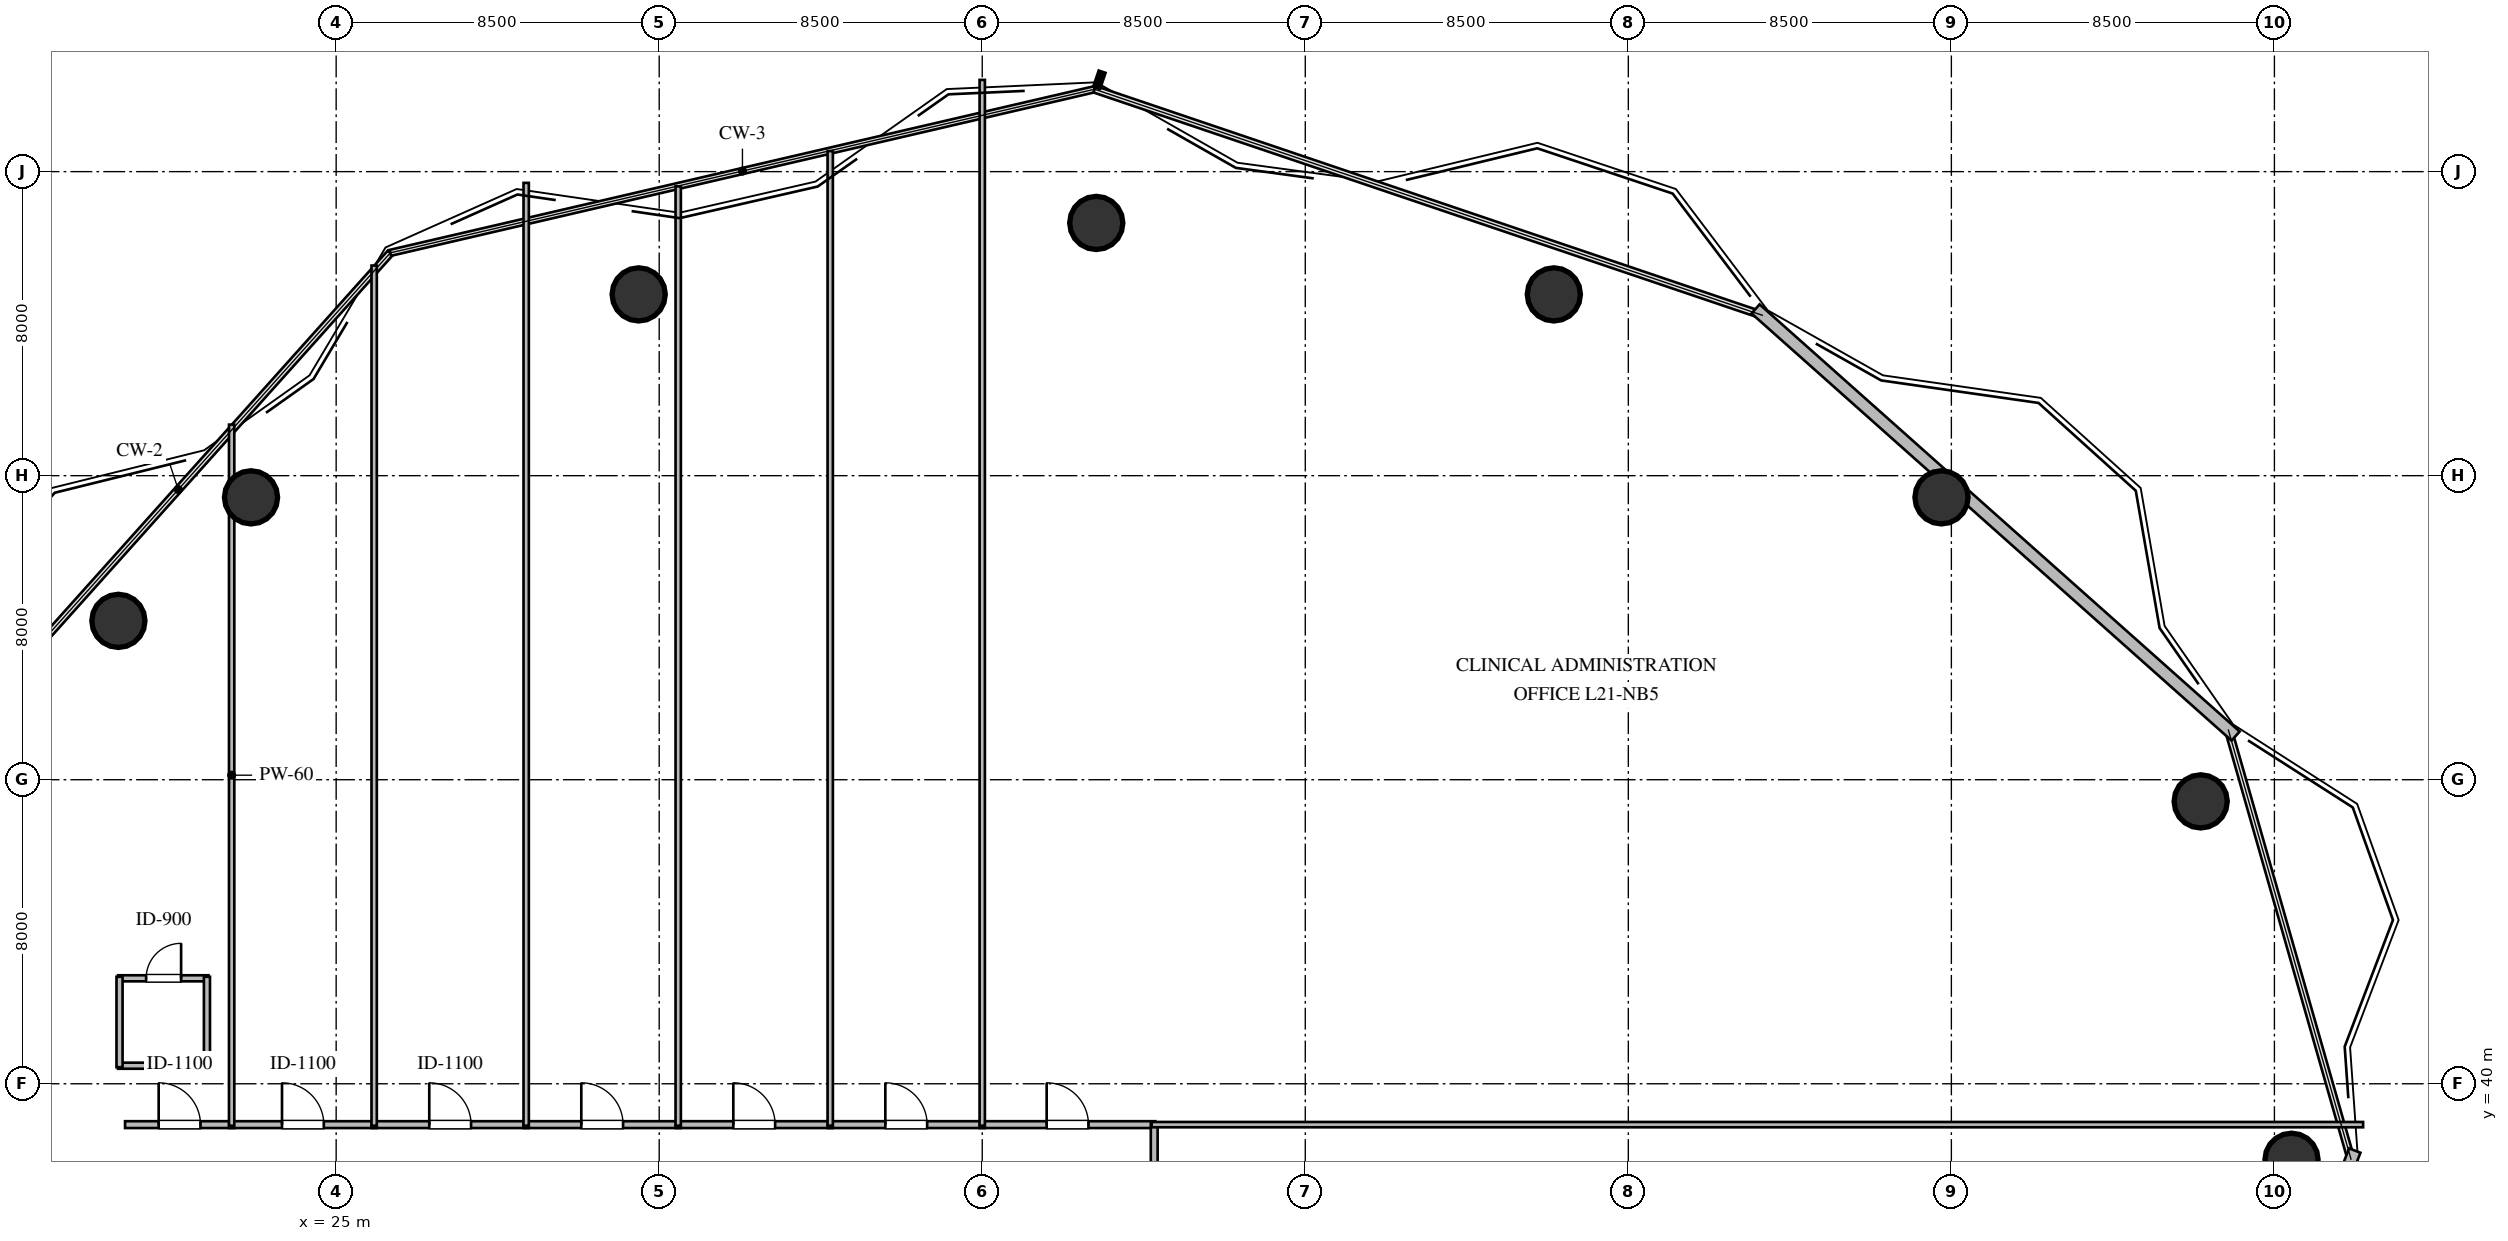
"""IFC4 building model, lengths in metres.
Left out: names, types, materials, properties, quantities, classifications, styles, units other than length and angle.
Written with IfcOpenShell. Run it as: python <this file> out.ifc"""

import sys

from ifc_helpers import new_model, si_unit, direction, frame, frame_2d, origin, origin_2d, place, context, subcontext, project, spatial, rectangle, circle, extrude, element, fill, save


model = new_model("IFC4")
c1 = context("Model", 3, precision=1e-05, world=origin(), true_north=direction((0.0, 1.0)))
c2 = subcontext(c1, "Body", "Model", "MODEL_VIEW")
j1 = project(units=[si_unit("LENGTHUNIT", "METRE"), si_unit("PLANEANGLEUNIT", "RADIAN")], contexts=[c1])
p1 = place(None, origin())
s1 = spatial("IfcSite", under=j1, at=p1, CompositionType="ELEMENT")
p2 = place(p1, origin())
s2 = spatial("IfcBuilding", under=s1, at=p2, CompositionType="ELEMENT")
p3 = place(p2, frame((0.0, 0.0, 81.6)))
s3 = spatial("IfcBuildingStorey", under=s2, at=p3, CompositionType="ELEMENT", Elevation=81.6)
for number, where, z_axis, x_axis in (
    (1, (76.45, 38.0, 0.0), (0.0, 0.0, 1.0), (1.0, 0.0, 0.0)),
    (2, (74.06, 47.43, 0.0), (0.0, 0.0, 1.0), (1.0, 0.0, 0.0)),
    (3, (67.24, 55.43, 0.0), (0.0, 0.0, 1.0), (1.0, 0.0, 0.0)),
    (4, (57.04, 60.77, 0.0), (0.0, 0.0, 1.0), (1.0, 0.0, 0.0)),
    (5, (45.0, 62.65, 0.0), (0.0, 0.0, 1.0), (1.0, 0.0, 0.0)),
    (6, (32.96, 60.77, 0.0), (0.0, 0.0, 1.0), (1.0, 0.0, 0.0)),
    (7, (22.76, 55.43, 0.0), (0.0, 0.0, 1.0), (1.0, 0.0, 0.0)),
    (8, (19.27, 52.18, 0.0), (0.0, 0.0, 1.0), (1.0, 0.0, 0.0)),
):
    element("IfcColumn", number, at=place(p3, frame(where, z_axis=z_axis, x_axis=x_axis)), inside=s3, PredefinedType="COLUMN", context=c2, shape_type="SweptSolid", body=[
        extrude(circle(Radius=0.7, at=origin_2d()), origin(), (0.0, 0.0, 1.0), 3.6),
    ])
p4 = place(p3, frame((78.114, 38.243, 0.0), z_axis=(0.0, 0.0, 1.0), x_axis=(-0.360517110943, -0.932752599952, 0.0)))
e9 = element("IfcWall", 9, at=p4, inside=s3, PredefinedType="STANDARD", context=c2, shape_type="SweptSolid", body=[
    extrude(rectangle(XDim=14.504, YDim=0.32, at=frame_2d((7.252, 0.0))), origin(), (0.0, 0.0, 1.0), 2.738),
])
p5 = place(p3, frame((62.348, 60.388, 0.0), z_axis=(0.0, 0.0, 1.0), x_axis=(0.747075414442, -0.664739291104, 0.0)))
e10 = element("IfcWall", 10, at=p5, inside=s3, PredefinedType="STANDARD", context=c2, shape_type="SweptSolid", body=[
    extrude(rectangle(XDim=16.907, YDim=0.32, at=frame_2d((8.454, 0.0))), origin(), (0.0, 0.0, 1.0), 3.36),
])
p6 = place(p3, frame((19.26, 40.475, 0.0), z_axis=(0.0, 0.0, 1.0), x_axis=(1.0, 0.0, 0.0)))
e11 = element("IfcWall", 11, at=p6, inside=s3, PredefinedType="PLUMBINGWALL", context=c2, shape_type="SweptSolid", body=[
    extrude(rectangle(XDim=2.38, YDim=0.16, at=frame_2d((1.19, 0.0))), origin(), (0.0, 0.0, 1.0), 3.36),
])
p7 = place(p3, frame((19.26, 42.775, 0.0), z_axis=(0.0, 0.0, 1.0), x_axis=(1.0, 0.0, 0.0)))
e12 = element("IfcWall", 12, at=p7, inside=s3, PredefinedType="PLUMBINGWALL", context=c2, shape_type="SweptSolid", body=[
    extrude(rectangle(XDim=2.38, YDim=0.16, at=frame_2d((1.19, 0.0))), origin(), (0.0, 0.0, 1.0), 3.36),
])
p8 = place(p7, frame((0.74, 0.0, 0.0)))
e13 = element("IfcOpeningElement", 13, at=p8, cuts=e12, PredefinedType="OPENING", context=c2, shape_type="SweptSolid", body=[
    extrude(rectangle(XDim=0.92, YDim=2.1, at=frame_2d((0.46, 1.05))), frame((0.0, 0.09, 0.0), z_axis=(0.0, -1.0, 0.0), x_axis=(1.0, 0.0, 0.0)), (0.0, 0.0, 1.0), 0.18),
])
p9 = place(p3, frame((19.3, 40.435, 0.0), z_axis=(0.0, 0.0, 1.0), x_axis=(0.0, 1.0, 0.0)))
e14 = element("IfcWall", 14, at=p9, inside=s3, PredefinedType="PLUMBINGWALL", context=c2, shape_type="SweptSolid", body=[
    extrude(rectangle(XDim=2.38, YDim=0.16, at=frame_2d((1.19, 0.0))), origin(), (0.0, 0.0, 1.0), 3.36),
])
p10 = place(p3, frame((21.6, 40.435, 0.0), z_axis=(0.0, 0.0, 1.0), x_axis=(0.0, 1.0, 0.0)))
e15 = element("IfcWall", 15, at=p10, inside=s3, PredefinedType="PLUMBINGWALL", context=c2, shape_type="SweptSolid", body=[
    extrude(rectangle(XDim=2.38, YDim=0.16, at=frame_2d((1.19, 0.0))), origin(), (0.0, 0.0, 1.0), 2.89),
])
p11 = place(p3, frame((19.445, 38.925, 0.0), z_axis=(0.0, 0.0, 1.0), x_axis=(1.0, 0.0, 0.0)))
e16 = element("IfcWall", 16, at=p11, inside=s3, PredefinedType="PARTITIONING", context=c2, shape_type="SweptSolid", body=[
    extrude(rectangle(XDim=2.87, YDim=0.18, at=frame_2d((1.435, 0.0))), origin(), (0.0, 0.0, 1.0), 3.36),
])
p12 = place(p11, frame((0.885, 0.0, 0.0)))
e17 = element("IfcOpeningElement", 17, at=p12, cuts=e16, PredefinedType="OPENING", context=c2, shape_type="SweptSolid", body=[
    extrude(rectangle(XDim=1.1, YDim=2.1, at=frame_2d((0.55, 1.05))), frame((0.0, 0.1, 0.0), z_axis=(0.0, -1.0, 0.0), x_axis=(1.0, 0.0, 0.0)), (0.0, 0.0, 1.0), 0.2),
])
p13 = place(p3, frame((22.185, 38.925, 0.0), z_axis=(0.0, 0.0, 1.0), x_axis=(1.0, 0.0, 0.0)))
e18 = element("IfcWall", 18, at=p13, inside=s3, PredefinedType="PARTITIONING", context=c2, shape_type="SweptSolid", body=[
    extrude(rectangle(XDim=3.88, YDim=0.18, at=frame_2d((1.94, 0.0))), origin(), (0.0, 0.0, 1.0), 3.36),
])
p14 = place(p13, frame((1.39, 0.0, 0.0)))
e19 = element("IfcOpeningElement", 19, at=p14, cuts=e18, PredefinedType="OPENING", context=c2, shape_type="SweptSolid", body=[
    extrude(rectangle(XDim=1.1, YDim=2.1, at=frame_2d((0.55, 1.05))), frame((0.0, 0.1, 0.0), z_axis=(0.0, -1.0, 0.0), x_axis=(1.0, 0.0, 0.0)), (0.0, 0.0, 1.0), 0.2),
])
p15 = place(p3, frame((25.935, 38.925, 0.0), z_axis=(0.0, 0.0, 1.0), x_axis=(1.0, 0.0, 0.0)))
e20 = element("IfcWall", 20, at=p15, inside=s3, PredefinedType="PARTITIONING", context=c2, shape_type="SweptSolid", body=[
    extrude(rectangle(XDim=4.13, YDim=0.18, at=frame_2d((2.065, 0.0))), origin(), (0.0, 0.0, 1.0), 3.36),
])
p16 = place(p15, frame((1.515, 0.0, 0.0)))
e21 = element("IfcOpeningElement", 21, at=p16, cuts=e20, PredefinedType="OPENING", context=c2, shape_type="SweptSolid", body=[
    extrude(rectangle(XDim=1.1, YDim=2.1, at=frame_2d((0.55, 1.05))), frame((0.0, 0.1, 0.0), z_axis=(0.0, -1.0, 0.0), x_axis=(1.0, 0.0, 0.0)), (0.0, 0.0, 1.0), 0.2),
])
p17 = place(p3, frame((29.935, 38.925, 0.0), z_axis=(0.0, 0.0, 1.0), x_axis=(1.0, 0.0, 0.0)))
e22 = element("IfcWall", 22, at=p17, inside=s3, PredefinedType="PARTITIONING", context=c2, shape_type="SweptSolid", body=[
    extrude(rectangle(XDim=4.13, YDim=0.18, at=frame_2d((2.065, 0.0))), origin(), (0.0, 0.0, 1.0), 3.36),
])
p18 = place(p17, frame((1.515, 0.0, 0.0)))
e23 = element("IfcOpeningElement", 23, at=p18, cuts=e22, PredefinedType="OPENING", context=c2, shape_type="SweptSolid", body=[
    extrude(rectangle(XDim=1.1, YDim=2.1, at=frame_2d((0.55, 1.05))), frame((0.0, 0.1, 0.0), z_axis=(0.0, -1.0, 0.0), x_axis=(1.0, 0.0, 0.0)), (0.0, 0.0, 1.0), 0.2),
])
p19 = place(p3, frame((33.935, 38.925, 0.0), z_axis=(0.0, 0.0, 1.0), x_axis=(1.0, 0.0, 0.0)))
e24 = element("IfcWall", 24, at=p19, inside=s3, PredefinedType="PARTITIONING", context=c2, shape_type="SweptSolid", body=[
    extrude(rectangle(XDim=4.13, YDim=0.18, at=frame_2d((2.065, 0.0))), origin(), (0.0, 0.0, 1.0), 3.36),
])
p20 = place(p19, frame((1.515, 0.0, 0.0)))
e25 = element("IfcOpeningElement", 25, at=p20, cuts=e24, PredefinedType="OPENING", context=c2, shape_type="SweptSolid", body=[
    extrude(rectangle(XDim=1.1, YDim=2.1, at=frame_2d((0.55, 1.05))), frame((0.0, 0.1, 0.0), z_axis=(0.0, -1.0, 0.0), x_axis=(1.0, 0.0, 0.0)), (0.0, 0.0, 1.0), 0.2),
])
p21 = place(p3, frame((37.935, 38.925, 0.0), z_axis=(0.0, 0.0, 1.0), x_axis=(1.0, 0.0, 0.0)))
e26 = element("IfcWall", 26, at=p21, inside=s3, PredefinedType="PARTITIONING", context=c2, shape_type="SweptSolid", body=[
    extrude(rectangle(XDim=4.13, YDim=0.18, at=frame_2d((2.065, 0.0))), origin(), (0.0, 0.0, 1.0), 3.36),
])
p22 = place(p21, frame((1.515, 0.0, 0.0)))
e27 = element("IfcOpeningElement", 27, at=p22, cuts=e26, PredefinedType="OPENING", context=c2, shape_type="SweptSolid", body=[
    extrude(rectangle(XDim=1.1, YDim=2.1, at=frame_2d((0.55, 1.05))), frame((0.0, 0.1, 0.0), z_axis=(0.0, -1.0, 0.0), x_axis=(1.0, 0.0, 0.0)), (0.0, 0.0, 1.0), 0.2),
])
p23 = place(p3, frame((41.935, 38.925, 0.0), z_axis=(0.0, 0.0, 1.0), x_axis=(1.0, 0.0, 0.0)))
e28 = element("IfcWall", 28, at=p23, inside=s3, PredefinedType="PARTITIONING", context=c2, shape_type="SweptSolid", body=[
    extrude(rectangle(XDim=4.62, YDim=0.18, at=frame_2d((2.31, 0.0))), origin(), (0.0, 0.0, 1.0), 3.36),
])
p24 = place(p23, frame((1.76, 0.0, 0.0)))
e29 = element("IfcOpeningElement", 29, at=p24, cuts=e28, PredefinedType="OPENING", context=c2, shape_type="SweptSolid", body=[
    extrude(rectangle(XDim=1.1, YDim=2.1, at=frame_2d((0.55, 1.05))), frame((0.0, 0.1, 0.0), z_axis=(0.0, -1.0, 0.0), x_axis=(1.0, 0.0, 0.0)), (0.0, 0.0, 1.0), 0.2),
])
p25 = place(p3, frame((46.525, 38.955, 0.0), z_axis=(0.0, 0.0, 1.0), x_axis=(0.0, -1.0, 0.0)))
e30 = element("IfcWall", 30, at=p25, inside=s3, PredefinedType="PARTITIONING", context=c2, shape_type="SweptSolid", body=[
    extrude(rectangle(XDim=4.31, YDim=0.18, at=frame_2d((2.155, 0.0))), origin(), (0.0, 0.0, 1.0), 3.36),
])
p26 = place(p25, frame((1.605, 0.0, 0.0)))
e31 = element("IfcOpeningElement", 31, at=p26, cuts=e30, PredefinedType="OPENING", context=c2, shape_type="SweptSolid", body=[
    extrude(rectangle(XDim=1.1, YDim=2.1, at=frame_2d((0.55, 1.05))), frame((0.0, 0.1, 0.0), z_axis=(0.0, -1.0, 0.0), x_axis=(1.0, 0.0, 0.0)), (0.0, 0.0, 1.0), 0.2),
])
p27 = place(p3, frame((22.25, 57.343, 0.0), z_axis=(0.0, 0.0, 1.0), x_axis=(0.0, -1.0, 0.0)))
e32 = element("IfcWall", 32, at=p27, inside=s3, PredefinedType="PARTITIONING", context=c2, shape_type="SweptSolid", body=[
    extrude(rectangle(XDim=18.448, YDim=0.14, at=frame_2d((9.224, 0.0))), origin(), (0.0, 0.0, 1.0), 2.89),
])
p28 = place(p3, frame((26.0, 61.529, 0.0), z_axis=(0.0, 0.0, 1.0), x_axis=(0.0, -1.0, 0.0)))
e33 = element("IfcWall", 33, at=p28, inside=s3, PredefinedType="PARTITIONING", context=c2, shape_type="SweptSolid", body=[
    extrude(rectangle(XDim=22.634, YDim=0.14, at=frame_2d((11.317, 0.0))), origin(), (0.0, 0.0, 1.0), 3.36),
])
p29 = place(p3, frame((30.0, 63.704, 0.0), z_axis=(0.0, 0.0, 1.0), x_axis=(0.0, -1.0, 0.0)))
e34 = element("IfcWall", 34, at=p29, inside=s3, PredefinedType="PARTITIONING", context=c2, shape_type="SweptSolid", body=[
    extrude(rectangle(XDim=24.809, YDim=0.14, at=frame_2d((12.405, 0.0))), origin(), (0.0, 0.0, 1.0), 2.89),
])
p30 = place(p3, frame((34.0, 63.613, 0.0), z_axis=(0.0, 0.0, 1.0), x_axis=(0.0, -1.0, 0.0)))
e35 = element("IfcWall", 35, at=p30, inside=s3, PredefinedType="PARTITIONING", context=c2, shape_type="SweptSolid", body=[
    extrude(rectangle(XDim=24.718, YDim=0.14, at=frame_2d((12.359, 0.0))), origin(), (0.0, 0.0, 1.0), 3.36),
])
p31 = place(p3, frame((38.0, 64.542, 0.0), z_axis=(0.0, 0.0, 1.0), x_axis=(0.0, -1.0, 0.0)))
e36 = element("IfcWall", 36, at=p31, inside=s3, PredefinedType="PARTITIONING", context=c2, shape_type="SweptSolid", body=[
    extrude(rectangle(XDim=25.647, YDim=0.14, at=frame_2d((12.823, 0.0))), origin(), (0.0, 0.0, 1.0), 3.36),
])
p32 = place(p3, frame((42.0, 66.414, 0.0), z_axis=(0.0, 0.0, 1.0), x_axis=(0.0, -1.0, 0.0)))
e37 = element("IfcWall", 37, at=p32, inside=s3, PredefinedType="PARTITIONING", context=c2, shape_type="SweptSolid", body=[
    extrude(rectangle(XDim=27.519, YDim=0.14, at=frame_2d((13.76, 0.0))), origin(), (0.0, 0.0, 1.0), 3.36),
])
p33 = place(p3, frame((78.334, 38.925, 0.0), z_axis=(0.0, 0.0, 1.0), x_axis=(-1.0, 0.0, 0.0)))
e38 = element("IfcWall", 38, at=p33, inside=s3, PredefinedType="PARTITIONING", context=c2, shape_type="SweptSolid", body=[
    extrude(rectangle(XDim=31.874, YDim=0.14, at=frame_2d((15.937, 0.0))), origin(), (0.0, 0.0, 1.0), 3.36),
])
p34 = place(p8, origin())
e39 = element("IfcDoor", 39, at=p34, inside=s3, OperationType="SINGLE_SWING_RIGHT", PredefinedType="DOOR", context=c2, shape_type="SweptSolid", body=[
    extrude(rectangle(XDim=0.92, YDim=2.1, at=frame_2d((0.46, 1.05))), frame((0.0, 0.025, 0.0), z_axis=(0.0, -1.0, 0.0), x_axis=(1.0, 0.0, 0.0)), (0.0, 0.0, 1.0), 0.05),
])
fill(e13, e39)
p35 = place(p12, origin())
e40 = element("IfcDoor", 40, at=p35, inside=s3, OperationType="SINGLE_SWING_LEFT", PredefinedType="DOOR", context=c2, shape_type="SweptSolid", body=[
    extrude(rectangle(XDim=1.1, YDim=2.1, at=frame_2d((0.55, 1.05))), frame((0.0, 0.025, 0.0), z_axis=(0.0, -1.0, 0.0), x_axis=(1.0, 0.0, 0.0)), (0.0, 0.0, 1.0), 0.05),
])
fill(e17, e40)
p36 = place(p14, origin())
e41 = element("IfcDoor", 41, at=p36, inside=s3, OperationType="SINGLE_SWING_LEFT", PredefinedType="DOOR", context=c2, shape_type="SweptSolid", body=[
    extrude(rectangle(XDim=1.1, YDim=2.1, at=frame_2d((0.55, 1.05))), frame((0.0, 0.025, 0.0), z_axis=(0.0, -1.0, 0.0), x_axis=(1.0, 0.0, 0.0)), (0.0, 0.0, 1.0), 0.05),
])
fill(e19, e41)
p37 = place(p16, origin())
e42 = element("IfcDoor", 42, at=p37, inside=s3, OperationType="SINGLE_SWING_LEFT", PredefinedType="DOOR", context=c2, shape_type="SweptSolid", body=[
    extrude(rectangle(XDim=1.1, YDim=2.1, at=frame_2d((0.55, 1.05))), frame((0.0, 0.025, 0.0), z_axis=(0.0, -1.0, 0.0), x_axis=(1.0, 0.0, 0.0)), (0.0, 0.0, 1.0), 0.05),
])
fill(e21, e42)
p38 = place(p18, origin())
e43 = element("IfcDoor", 43, at=p38, inside=s3, OperationType="SINGLE_SWING_LEFT", PredefinedType="DOOR", context=c2, shape_type="SweptSolid", body=[
    extrude(rectangle(XDim=1.1, YDim=2.1, at=frame_2d((0.55, 1.05))), frame((0.0, 0.025, 0.0), z_axis=(0.0, -1.0, 0.0), x_axis=(1.0, 0.0, 0.0)), (0.0, 0.0, 1.0), 0.05),
])
fill(e23, e43)
p39 = place(p20, origin())
e44 = element("IfcDoor", 44, at=p39, inside=s3, OperationType="SINGLE_SWING_LEFT", PredefinedType="DOOR", context=c2, shape_type="SweptSolid", body=[
    extrude(rectangle(XDim=1.1, YDim=2.1, at=frame_2d((0.55, 1.05))), frame((0.0, 0.025, 0.0), z_axis=(0.0, -1.0, 0.0), x_axis=(1.0, 0.0, 0.0)), (0.0, 0.0, 1.0), 0.05),
])
fill(e25, e44)
p40 = place(p22, origin())
e45 = element("IfcDoor", 45, at=p40, inside=s3, OperationType="SINGLE_SWING_LEFT", PredefinedType="DOOR", context=c2, shape_type="SweptSolid", body=[
    extrude(rectangle(XDim=1.1, YDim=2.1, at=frame_2d((0.55, 1.05))), frame((0.0, 0.025, 0.0), z_axis=(0.0, -1.0, 0.0), x_axis=(1.0, 0.0, 0.0)), (0.0, 0.0, 1.0), 0.05),
])
fill(e27, e45)
p41 = place(p24, origin())
e46 = element("IfcDoor", 46, at=p41, inside=s3, OperationType="SINGLE_SWING_LEFT", PredefinedType="DOOR", context=c2, shape_type="SweptSolid", body=[
    extrude(rectangle(XDim=1.1, YDim=2.1, at=frame_2d((0.55, 1.05))), frame((0.0, 0.025, 0.0), z_axis=(0.0, -1.0, 0.0), x_axis=(1.0, 0.0, 0.0)), (0.0, 0.0, 1.0), 0.05),
])
fill(e29, e46)
save(model, sys.argv[1])
